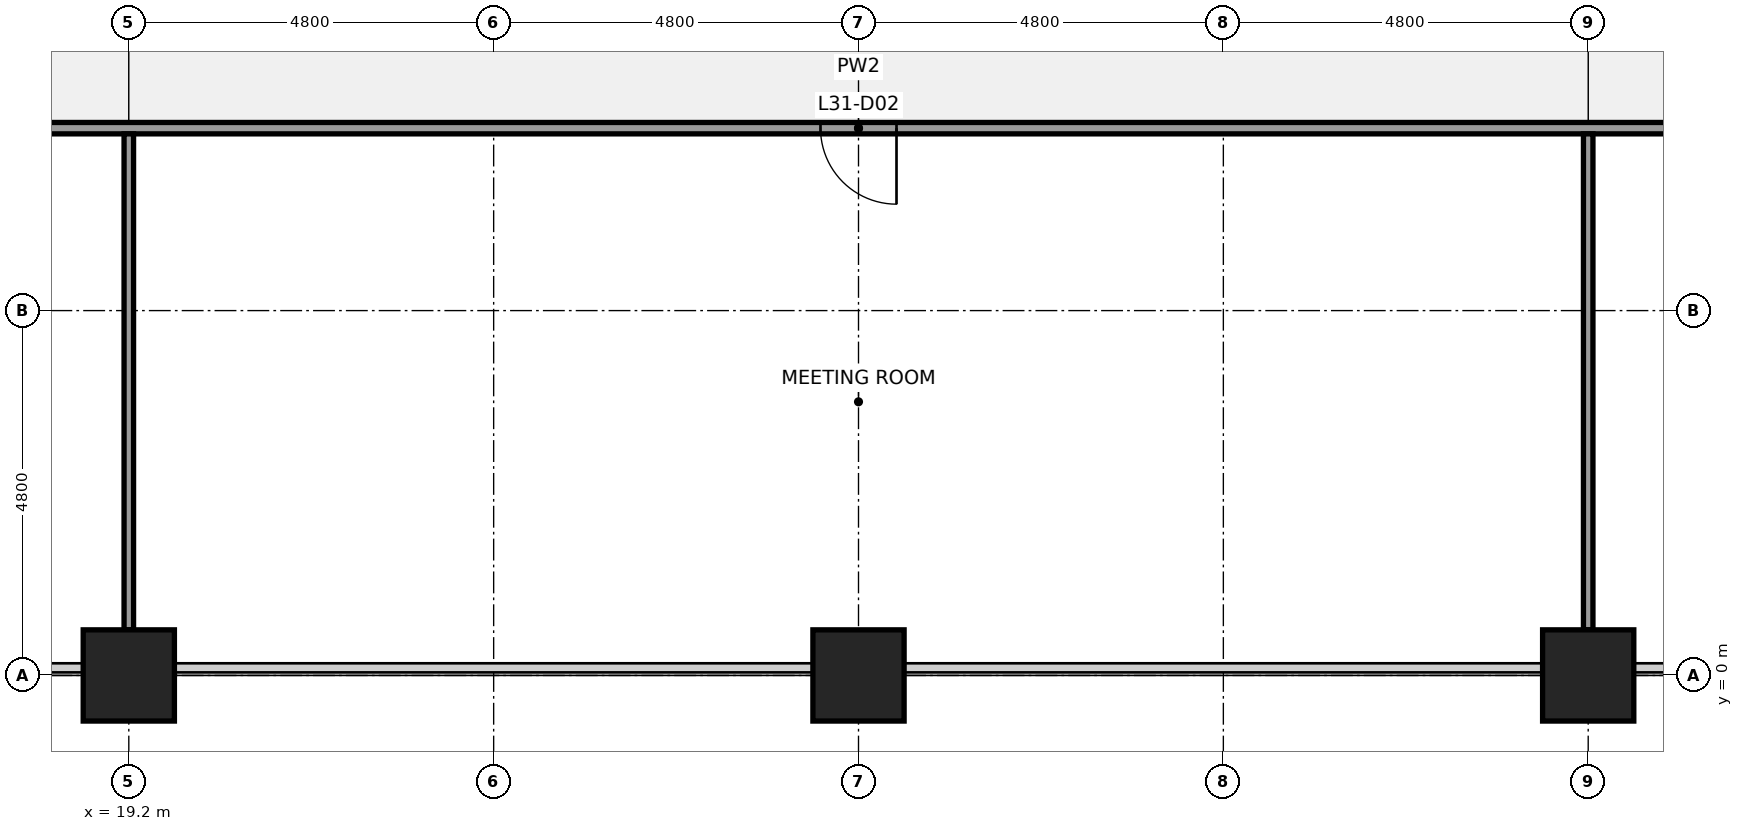
"""IFC4 building model, lengths in metres.
Left out: names, types, materials, properties, quantities, classifications, styles, units other than length and angle.
Written with IfcOpenShell. Run it as: python <this file> out.ifc"""

import sys

from ifc_helpers import new_model, si_unit, direction, frame, frame_2d, origin, origin_2d, place, context, subcontext, project, spatial, rectangle, extrude, element, fill, save


model = new_model("IFC4")
c1 = context("Model", 3, precision=1e-05, world=origin(), true_north=direction((0.0, 1.0)))
c2 = subcontext(c1, "Body", "Model", "MODEL_VIEW")
j1 = project(units=[si_unit("LENGTHUNIT", "METRE"), si_unit("PLANEANGLEUNIT", "RADIAN")], contexts=[c1])
p1 = place(None, origin())
s1 = spatial("IfcSite", under=j1, at=p1, CompositionType="ELEMENT")
p2 = place(p1, origin())
s2 = spatial("IfcBuilding", under=s1, at=p2, CompositionType="ELEMENT")
p3 = place(p2, frame((0.0, 0.0, 144.1)))
s3 = spatial("IfcBuildingStorey", under=s2, at=p3, CompositionType="ELEMENT", Elevation=144.1)
for number, where, z_axis, x_axis in (
    (1, (19.2, 0.0, 0.0), (0.0, 0.0, 1.0), (1.0, 0.0, 0.0)),
    (2, (28.8, 0.0, 0.0), (0.0, 0.0, 1.0), (1.0, 0.0, 0.0)),
    (3, (38.4, 0.0, 0.0), (0.0, 0.0, 1.0), (1.0, 0.0, 0.0)),
):
    element("IfcColumn", number, at=place(p3, frame(where, z_axis=z_axis, x_axis=x_axis)), inside=s3, PredefinedType="COLUMN", context=c2, shape_type="SweptSolid", body=[
        extrude(rectangle(XDim=1.2, YDim=1.2, at=origin_2d()), origin(), (0.0, 0.0, 1.0), 4.0),
    ])
p4 = place(p3, frame((14.325, 7.2, 0.0), z_axis=(0.0, 0.0, 1.0), x_axis=(1.0, 0.0, 0.0)))
e4 = element("IfcWall", 4, at=p4, inside=s3, PredefinedType="PARTITIONING", context=c2, shape_type="SweptSolid", body=[
    extrude(rectangle(XDim=28.95, YDim=0.15, at=frame_2d((14.475, 0.0))), origin(), (0.0, 0.0, 1.0), 2.936),
])
p5 = place(p4, frame((1.975, 0.0, 0.0)))
e5 = element("IfcOpeningElement", 5, at=p5, cuts=e4, PredefinedType="OPENING", context=c2, shape_type="SweptSolid", body=[
    extrude(rectangle(XDim=1.0, YDim=2.1, at=frame_2d((0.5, 1.05))), frame((0.0, 0.085, 0.0), z_axis=(0.0, -1.0, 0.0), x_axis=(1.0, 0.0, 0.0)), (0.0, 0.0, 1.0), 0.17),
])
p6 = place(p4, frame((13.975, 0.0, 0.0)))
e6 = element("IfcOpeningElement", 6, at=p6, cuts=e4, PredefinedType="OPENING", context=c2, shape_type="SweptSolid", body=[
    extrude(rectangle(XDim=1.0, YDim=2.1, at=frame_2d((0.5, 1.05))), frame((0.0, 0.085, 0.0), z_axis=(0.0, -1.0, 0.0), x_axis=(1.0, 0.0, 0.0)), (0.0, 0.0, 1.0), 0.17),
])
p7 = place(p4, frame((25.975, 0.0, 0.0)))
e7 = element("IfcOpeningElement", 7, at=p7, cuts=e4, PredefinedType="OPENING", context=c2, shape_type="SweptSolid", body=[
    extrude(rectangle(XDim=1.0, YDim=2.1, at=frame_2d((0.5, 1.05))), frame((0.0, 0.085, 0.0), z_axis=(0.0, -1.0, 0.0), x_axis=(1.0, 0.0, 0.0)), (0.0, 0.0, 1.0), 0.17),
])
for number, where, z_axis, x_axis in (
    (8, (19.2, 0.6, 0.0), (0.0, 0.0, 1.0), (0.0, 1.0, 0.0)),
    (9, (38.4, 0.6, 0.0), (0.0, 0.0, 1.0), (0.0, 1.0, 0.0)),
):
    element("IfcWall", number, at=place(p3, frame(where, z_axis=z_axis, x_axis=x_axis)), inside=s3, PredefinedType="PARTITIONING", context=c2, shape_type="SweptSolid", body=[
        extrude(rectangle(XDim=6.525, YDim=0.125, at=frame_2d((3.262, 0.0))), origin(), (0.0, 0.0, 1.0), 2.936),
    ])
for number, where, z_axis, x_axis in (
    (10, (19.2, -1.05, 0.0), (0.0, 0.0, 1.0), (1.0, 0.0, 0.0)),
    (11, (38.4, -1.05, 0.0), (0.0, 0.0, 1.0), (1.0, 0.0, 0.0)),
):
    element("IfcColumn", number, at=place(p3, frame(where, z_axis=z_axis, x_axis=x_axis)), inside=s3, PredefinedType="PILASTER", context=c2, shape_type="SweptSolid", body=[
        extrude(rectangle(XDim=3.6, YDim=0.9, at=origin_2d()), origin(), (0.0, 0.0, 1.0), 4.0),
    ])
p8 = place(p6, origin())
e12 = element("IfcDoor", 12, at=p8, inside=s3, OperationType="SINGLE_SWING_RIGHT", PredefinedType="DOOR", context=c2, shape_type="SweptSolid", body=[
    extrude(rectangle(XDim=1.0, YDim=2.1, at=frame_2d((0.5, 1.05))), frame((0.0, 0.025, 0.0), z_axis=(0.0, -1.0, 0.0), x_axis=(1.0, 0.0, 0.0)), (0.0, 0.0, 1.0), 0.05),
])
fill(e6, e12)
save(model, sys.argv[1])
